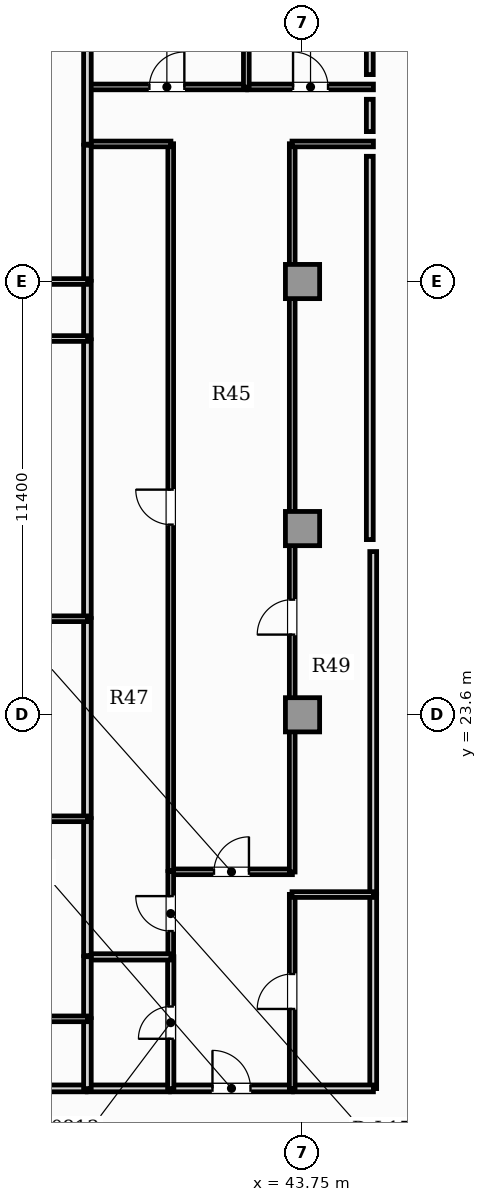
"""IFC4 building model, lengths in metres.
Left out: names, types, materials, properties, quantities, classifications, styles, units other than length and angle.
Written with IfcOpenShell. Run it as: python <this file> out.ifc"""

import sys

from ifc_helpers import new_model, si_unit, direction, frame, frame_2d, origin, origin_2d, place, context, subcontext, project, spatial, rectangle, extrude, element, fill, save


model = new_model("IFC4")
c1 = context("Model", 3, precision=1e-05, world=origin(), true_north=direction((0.0, 1.0)))
c2 = subcontext(c1, "Body", "Model", "MODEL_VIEW")
j1 = project(units=[si_unit("LENGTHUNIT", "METRE"), si_unit("PLANEANGLEUNIT", "RADIAN")], contexts=[c1])
p1 = place(None, origin())
s1 = spatial("IfcSite", under=j1, at=p1, CompositionType="ELEMENT")
p2 = place(p1, origin())
s2 = spatial("IfcBuilding", under=s1, at=p2, CompositionType="ELEMENT")
p3 = place(p2, frame((0.0, 0.0, 72.15)))
s3 = spatial("IfcBuildingStorey", under=s2, at=p3, CompositionType="ELEMENT", Elevation=72.15)
for number, where, z_axis, x_axis in (
    (1, (43.75, 23.6, 0.0), (0.0, 0.0, 1.0), (1.0, 0.0, 0.0)),
    (2, (43.75, 28.5, 0.0), (0.0, 0.0, 1.0), (1.0, 0.0, 0.0)),
    (3, (43.75, 35.0, 0.0), (0.0, 0.0, 1.0), (1.0, 0.0, 0.0)),
):
    element("IfcColumn", number, at=place(p3, frame(where, z_axis=z_axis, x_axis=x_axis)), inside=s3, PredefinedType="COLUMN", context=c2, shape_type="SweptSolid", body=[
        extrude(rectangle(XDim=0.9, YDim=0.9, at=origin_2d()), origin(), (0.0, 0.0, 1.0), 3.85),
    ])
p4 = place(p3, frame((40.277, 13.77, 0.0), z_axis=(0.0, 0.0, 1.0), x_axis=(1.0, 0.0, 0.0)))
e4 = element("IfcWall", 4, at=p4, inside=s3, PredefinedType="PARTITIONING", context=c2, shape_type="SweptSolid", body=[
    extrude(rectangle(XDim=3.206, YDim=0.18, at=frame_2d((1.603, 0.0))), origin(), (0.0, 0.0, 1.0), 3.57),
])
p5 = place(p4, frame((1.103, 0.0, 0.0)))
e5 = element("IfcOpeningElement", 5, at=p5, cuts=e4, PredefinedType="OPENING", context=c2, shape_type="SweptSolid", body=[
    extrude(rectangle(XDim=1.0, YDim=2.15, at=frame_2d((0.5, 1.075))), frame((0.0, 0.1, 0.0), z_axis=(0.0, -1.0, 0.0), x_axis=(1.0, 0.0, 0.0)), (0.0, 0.0, 1.0), 0.2),
])
p6 = place(p3, frame((38.085, 13.77, 0.0), z_axis=(0.0, 0.0, 1.0), x_axis=(1.0, 0.0, 0.0)))
e6 = element("IfcWall", 6, at=p6, inside=s3, PredefinedType="PARTITIONING", context=c2, shape_type="SweptSolid", body=[
    extrude(rectangle(XDim=2.162, YDim=0.18, at=frame_2d((1.081, 0.0))), origin(), (0.0, 0.0, 1.0), 3.57),
])
p7 = place(p3, frame((45.61, 13.765, 0.0), z_axis=(0.0, 0.0, 1.0), x_axis=(0.0, 1.0, 0.0)))
e7 = element("IfcWall", 7, at=p7, inside=s3, PredefinedType="PARTITIONING", context=c2, shape_type="SweptSolid", body=[
    extrude(rectangle(XDim=5.11, YDim=0.18, at=frame_2d((2.555, 0.0))), origin(), (0.0, 0.0, 1.0), 3.57),
])
p8 = place(p3, frame((43.514, 13.77, 0.0), z_axis=(0.0, 0.0, 1.0), x_axis=(1.0, 0.0, 0.0)))
e8 = element("IfcWall", 8, at=p8, inside=s3, PredefinedType="PARTITIONING", context=c2, shape_type="SweptSolid", body=[
    extrude(rectangle(XDim=2.101, YDim=0.18, at=frame_2d((1.051, 0.0))), origin(), (0.0, 0.0, 1.0), 3.57),
])
p9 = place(p3, frame((45.61, 18.905, 0.0), z_axis=(0.0, 0.0, 1.0), x_axis=(0.0, 1.0, 0.0)))
e9 = element("IfcWall", 9, at=p9, inside=s3, PredefinedType="PARTITIONING", context=c2, shape_type="SweptSolid", body=[
    extrude(rectangle(XDim=8.99, YDim=0.18, at=frame_2d((4.495, 0.0))), origin(), (0.0, 0.0, 1.0), 3.57),
])
p10 = place(p3, frame((31.275, 13.77, 0.0), z_axis=(0.0, 0.0, 1.0), x_axis=(1.0, 0.0, 0.0)))
e10 = element("IfcWall", 10, at=p10, inside=s3, PredefinedType="PARTITIONING", context=c2, shape_type="SweptSolid", body=[
    extrude(rectangle(XDim=6.78, YDim=0.18, at=frame_2d((3.39, 0.0))), origin(), (0.0, 0.0, 1.0), 3.57),
])
p11 = place(p3, frame((40.277, 19.469, 0.0), z_axis=(0.0, 0.0, 1.0), x_axis=(1.0, 0.0, 0.0)))
e11 = element("IfcWall", 11, at=p11, inside=s3, PredefinedType="PARTITIONING", context=c2, shape_type="SweptSolid", body=[
    extrude(rectangle(XDim=3.206, YDim=0.15, at=frame_2d((1.603, 0.0))), origin(), (0.0, 0.0, 1.0), 3.57),
])
p12 = place(p11, frame((1.143, 0.0, 0.0)))
e12 = element("IfcOpeningElement", 12, at=p12, cuts=e11, PredefinedType="OPENING", context=c2, shape_type="SweptSolid", body=[
    extrude(rectangle(XDim=0.92, YDim=2.1, at=frame_2d((0.46, 1.05))), frame((0.0, 0.085, 0.0), z_axis=(0.0, -1.0, 0.0), x_axis=(1.0, 0.0, 0.0)), (0.0, 0.0, 1.0), 0.17),
])
p13 = place(p3, frame((40.282, 13.765, 0.0), z_axis=(0.0, 0.0, 1.0), x_axis=(0.0, 1.0, 0.0)))
e13 = element("IfcWall", 13, at=p13, inside=s3, PredefinedType="PLUMBINGWALL", context=c2, shape_type="SweptSolid", body=[
    extrude(rectangle(XDim=3.47, YDim=0.165, at=frame_2d((1.735, 0.0))), origin(), (0.0, 0.0, 1.0), 3.57),
])
p14 = place(p13, frame((1.31, 0.0, 0.0)))
e14 = element("IfcOpeningElement", 14, at=p14, cuts=e13, PredefinedType="OPENING", context=c2, shape_type="SweptSolid", body=[
    extrude(rectangle(XDim=0.85, YDim=2.1, at=frame_2d((0.425, 1.05))), frame((0.0, 0.093, 0.0), z_axis=(0.0, -1.0, 0.0), x_axis=(1.0, 0.0, 0.0)), (0.0, 0.0, 1.0), 0.185),
])
p15 = place(p3, frame((40.282, 17.265, 0.0), z_axis=(0.0, 0.0, 1.0), x_axis=(0.0, 1.0, 0.0)))
e15 = element("IfcWall", 15, at=p15, inside=s3, PredefinedType="PARTITIONING", context=c2, shape_type="SweptSolid", body=[
    extrude(rectangle(XDim=2.209, YDim=0.15, at=frame_2d((1.104, 0.0))), origin(), (0.0, 0.0, 1.0), 3.57),
])
p16 = place(p15, frame((0.644, 0.0, 0.0)))
e16 = element("IfcOpeningElement", 16, at=p16, cuts=e15, PredefinedType="OPENING", context=c2, shape_type="SweptSolid", body=[
    extrude(rectangle(XDim=0.92, YDim=2.1, at=frame_2d((0.46, 1.05))), frame((0.0, 0.085, 0.0), z_axis=(0.0, -1.0, 0.0), x_axis=(1.0, 0.0, 0.0)), (0.0, 0.0, 1.0), 0.17),
])
p17 = place(p3, frame((43.479, 13.765, 0.0), z_axis=(0.0, 0.0, 1.0), x_axis=(0.0, 1.0, 0.0)))
e17 = element("IfcWall", 17, at=p17, inside=s3, PredefinedType="PARTITIONING", context=c2, shape_type="SweptSolid", body=[
    extrude(rectangle(XDim=5.11, YDim=0.15, at=frame_2d((2.555, 0.0))), origin(), (0.0, 0.0, 1.0), 3.57),
])
p18 = place(p17, frame((2.095, 0.0, 0.0)))
e18 = element("IfcOpeningElement", 18, at=p18, cuts=e17, PredefinedType="OPENING", context=c2, shape_type="SweptSolid", body=[
    extrude(rectangle(XDim=0.92, YDim=2.1, at=frame_2d((0.46, 1.05))), frame((0.0, 0.085, 0.0), z_axis=(0.0, -1.0, 0.0), x_axis=(1.0, 0.0, 0.0)), (0.0, 0.0, 1.0), 0.17),
])
p19 = place(p3, frame((40.282, 19.504, 0.0), z_axis=(0.0, 0.0, 1.0), x_axis=(0.0, 1.0, 0.0)))
e19 = element("IfcWall", 19, at=p19, inside=s3, PredefinedType="PARTITIONING", context=c2, shape_type="SweptSolid", body=[
    extrude(rectangle(XDim=19.121, YDim=0.15, at=frame_2d((9.561, 0.0))), origin(), (0.0, 0.0, 1.0), 3.57),
])
p20 = place(p19, frame((9.101, 0.0, 0.0)))
e20 = element("IfcOpeningElement", 20, at=p20, cuts=e19, PredefinedType="OPENING", context=c2, shape_type="SweptSolid", body=[
    extrude(rectangle(XDim=0.92, YDim=2.1, at=frame_2d((0.46, 1.05))), frame((0.0, 0.085, 0.0), z_axis=(0.0, -1.0, 0.0), x_axis=(1.0, 0.0, 0.0)), (0.0, 0.0, 1.0), 0.17),
])
p21 = place(p3, frame((38.085, 38.62, 0.0), z_axis=(0.0, 0.0, 1.0), x_axis=(1.0, 0.0, 0.0)))
e21 = element("IfcWall", 21, at=p21, inside=s3, PredefinedType="PARTITIONING", context=c2, shape_type="SweptSolid", body=[
    extrude(rectangle(XDim=2.202, YDim=0.15, at=frame_2d((1.101, 0.0))), origin(), (0.0, 0.0, 1.0), 3.57),
])
p22 = place(p3, frame((43.479, 19.464, 0.0), z_axis=(0.0, 0.0, 1.0), x_axis=(0.0, 1.0, 0.0)))
e22 = element("IfcWall", 22, at=p22, inside=s3, PredefinedType="PARTITIONING", context=c2, shape_type="SweptSolid", body=[
    extrude(rectangle(XDim=19.161, YDim=0.15, at=frame_2d((9.581, 0.0))), origin(), (0.0, 0.0, 1.0), 3.57),
])
p23 = place(p22, frame((6.247, 0.0, 0.0)))
e23 = element("IfcOpeningElement", 23, at=p23, cuts=e22, PredefinedType="OPENING", context=c2, shape_type="SweptSolid", body=[
    extrude(rectangle(XDim=0.92, YDim=2.1, at=frame_2d((0.46, 1.05))), frame((0.0, 0.085, 0.0), z_axis=(0.0, -1.0, 0.0), x_axis=(1.0, 0.0, 0.0)), (0.0, 0.0, 1.0), 0.17),
])
p24 = place(p3, frame((43.474, 38.62, 0.0), z_axis=(0.0, 0.0, 1.0), x_axis=(1.0, 0.0, 0.0)))
e24 = element("IfcWall", 24, at=p24, inside=s3, PredefinedType="PARTITIONING", context=c2, shape_type="SweptSolid", body=[
    extrude(rectangle(XDim=2.141, YDim=0.15, at=frame_2d((1.071, 0.0))), origin(), (0.0, 0.0, 1.0), 3.57),
])
p25 = place(p3, frame((38.085, 40.12, 0.0), z_axis=(0.0, 0.0, 1.0), x_axis=(1.0, 0.0, 0.0)))
e25 = element("IfcWall", 25, at=p25, inside=s3, PredefinedType="PARTITIONING", context=c2, shape_type="SweptSolid", body=[
    extrude(rectangle(XDim=4.191, YDim=0.15, at=frame_2d((2.096, 0.0))), origin(), (0.0, 0.0, 1.0), 3.57),
])
p26 = place(p25, frame((1.635, 0.0, 0.0)))
e26 = element("IfcOpeningElement", 26, at=p26, cuts=e25, PredefinedType="OPENING", context=c2, shape_type="SweptSolid", body=[
    extrude(rectangle(XDim=0.92, YDim=2.1, at=frame_2d((0.46, 1.05))), frame((0.0, 0.085, 0.0), z_axis=(0.0, -1.0, 0.0), x_axis=(1.0, 0.0, 0.0)), (0.0, 0.0, 1.0), 0.17),
])
p27 = place(p3, frame((42.306, 40.12, 0.0), z_axis=(0.0, 0.0, 1.0), x_axis=(1.0, 0.0, 0.0)))
e27 = element("IfcWall", 27, at=p27, inside=s3, PredefinedType="PARTITIONING", context=c2, shape_type="SweptSolid", body=[
    extrude(rectangle(XDim=3.309, YDim=0.15, at=frame_2d((1.654, 0.0))), origin(), (0.0, 0.0, 1.0), 3.57),
])
p28 = place(p27, frame((1.194, 0.0, 0.0)))
e28 = element("IfcOpeningElement", 28, at=p28, cuts=e27, PredefinedType="OPENING", context=c2, shape_type="SweptSolid", body=[
    extrude(rectangle(XDim=0.92, YDim=2.1, at=frame_2d((0.46, 1.05))), frame((0.0, 0.085, 0.0), z_axis=(0.0, -1.0, 0.0), x_axis=(1.0, 0.0, 0.0)), (0.0, 0.0, 1.0), 0.17),
])
p29 = place(p3, frame((38.09, 38.615, 0.0), z_axis=(0.0, 0.0, 1.0), x_axis=(0.0, 1.0, 0.0)))
e29 = element("IfcWall", 29, at=p29, inside=s3, PredefinedType="PARTITIONING", context=c2, shape_type="SweptSolid", body=[
    extrude(rectangle(XDim=2.775, YDim=0.2, at=frame_2d((1.387, 0.0))), origin(), (0.0, 0.0, 1.0), 3.57),
])
p30 = place(p3, frame((38.085, 17.23, 0.0), z_axis=(0.0, 0.0, 1.0), x_axis=(1.0, 0.0, 0.0)))
e30 = element("IfcWall", 30, at=p30, inside=s3, PredefinedType="PLUMBINGWALL", context=c2, shape_type="SweptSolid", body=[
    extrude(rectangle(XDim=2.202, YDim=0.165, at=frame_2d((1.101, 0.0))), origin(), (0.0, 0.0, 1.0), 3.57),
])
p31 = place(p3, frame((38.09, 13.765, 0.0), z_axis=(0.0, 0.0, 1.0), x_axis=(0.0, 1.0, 0.0)))
e31 = element("IfcWall", 31, at=p31, inside=s3, PredefinedType="PARTITIONING", context=c2, shape_type="SweptSolid", body=[
    extrude(rectangle(XDim=1.84, YDim=0.2, at=frame_2d((0.92, 0.0))), origin(), (0.0, 0.0, 1.0), 3.57),
])
p32 = place(p3, frame((38.09, 15.635, 0.0), z_axis=(0.0, 0.0, 1.0), x_axis=(0.0, 1.0, 0.0)))
e32 = element("IfcWall", 32, at=p32, inside=s3, PredefinedType="PARTITIONING", context=c2, shape_type="SweptSolid", body=[
    extrude(rectangle(XDim=1.6, YDim=0.2, at=frame_2d((0.8, 0.0))), origin(), (0.0, 0.0, 1.0), 3.57),
])
p33 = place(p3, frame((38.09, 33.495, 0.0), z_axis=(0.0, 0.0, 1.0), x_axis=(0.0, 1.0, 0.0)))
e33 = element("IfcWall", 33, at=p33, inside=s3, PredefinedType="PARTITIONING", context=c2, shape_type="SweptSolid", body=[
    extrude(rectangle(XDim=1.51, YDim=0.2, at=frame_2d((0.755, 0.0))), origin(), (0.0, 0.0, 1.0), 3.57),
])
p34 = place(p3, frame((38.09, 17.265, 0.0), z_axis=(0.0, 0.0, 1.0), x_axis=(0.0, 1.0, 0.0)))
e34 = element("IfcWall", 34, at=p34, inside=s3, PredefinedType="PARTITIONING", context=c2, shape_type="SweptSolid", body=[
    extrude(rectangle(XDim=3.604, YDim=0.2, at=frame_2d((1.802, 0.0))), origin(), (0.0, 0.0, 1.0), 3.57),
])
p35 = place(p3, frame((38.09, 20.899, 0.0), z_axis=(0.0, 0.0, 1.0), x_axis=(0.0, 1.0, 0.0)))
e35 = element("IfcWall", 35, at=p35, inside=s3, PredefinedType="PARTITIONING", context=c2, shape_type="SweptSolid", body=[
    extrude(rectangle(XDim=5.234, YDim=0.2, at=frame_2d((2.617, 0.0))), origin(), (0.0, 0.0, 1.0), 3.57),
])
p36 = place(p3, frame((38.09, 26.162, 0.0), z_axis=(0.0, 0.0, 1.0), x_axis=(0.0, 1.0, 0.0)))
e36 = element("IfcWall", 36, at=p36, inside=s3, PredefinedType="PARTITIONING", context=c2, shape_type="SweptSolid", body=[
    extrude(rectangle(XDim=7.303, YDim=0.2, at=frame_2d((3.651, 0.0))), origin(), (0.0, 0.0, 1.0), 3.57),
])
p37 = place(p3, frame((38.09, 35.035, 0.0), z_axis=(0.0, 0.0, 1.0), x_axis=(0.0, 1.0, 0.0)))
e37 = element("IfcWall", 37, at=p37, inside=s3, PredefinedType="PARTITIONING", context=c2, shape_type="SweptSolid", body=[
    extrude(rectangle(XDim=3.55, YDim=0.2, at=frame_2d((1.775, 0.0))), origin(), (0.0, 0.0, 1.0), 3.57),
])
p38 = place(p3, frame((43.474, 18.87, 0.0), z_axis=(0.0, 0.0, 1.0), x_axis=(1.0, 0.0, 0.0)))
e38 = element("IfcWall", 38, at=p38, inside=s3, PredefinedType="PARTITIONING", context=c2, shape_type="SweptSolid", body=[
    extrude(rectangle(XDim=2.141, YDim=0.15, at=frame_2d((1.071, 0.0))), origin(), (0.0, 0.0, 1.0), 3.57),
])
p39 = place(p3, frame((42.271, 40.115, 0.0), z_axis=(0.0, 0.0, 1.0), x_axis=(0.0, 1.0, 0.0)))
e39 = element("IfcWall", 39, at=p39, inside=s3, PredefinedType="PARTITIONING", context=c2, shape_type="SweptSolid", body=[
    extrude(rectangle(XDim=6.075, YDim=0.15, at=frame_2d((3.038, 0.0))), origin(), (0.0, 0.0, 1.0), 3.57),
])
p40 = place(p3, frame((31.235, 33.5, 0.0), z_axis=(0.0, 0.0, 1.0), x_axis=(1.0, 0.0, 0.0)))
e40 = element("IfcWall", 40, at=p40, inside=s3, PredefinedType="PARTITIONING", context=c2, shape_type="SweptSolid", body=[
    extrude(rectangle(XDim=6.86, YDim=0.15, at=frame_2d((3.43, 0.0))), origin(), (0.0, 0.0, 1.0), 3.57),
])
p41 = place(p3, frame((32.894, 35.0, 0.0), z_axis=(0.0, 0.0, 1.0), x_axis=(1.0, 0.0, 0.0)))
e41 = element("IfcWall", 41, at=p41, inside=s3, PredefinedType="PARTITIONING", context=c2, shape_type="SweptSolid", body=[
    extrude(rectangle(XDim=5.201, YDim=0.15, at=frame_2d((2.601, 0.0))), origin(), (0.0, 0.0, 1.0), 2.934),
])
p42 = place(p41, frame((1.361, 0.0, 0.0)))
e42 = element("IfcOpeningElement", 42, at=p42, cuts=e41, PredefinedType="OPENING", context=c2, shape_type="SweptSolid", body=[
    extrude(rectangle(XDim=0.92, YDim=2.1, at=frame_2d((0.46, 1.05))), frame((0.0, 0.085, 0.0), z_axis=(0.0, -1.0, 0.0), x_axis=(1.0, 0.0, 0.0)), (0.0, 0.0, 1.0), 0.17),
])
for number, where, z_axis, x_axis in (
    (43, (31.235, 15.6, 0.0), (0.0, 0.0, 1.0), (1.0, 0.0, 0.0)),
    (44, (31.235, 20.864, 0.0), (0.0, 0.0, 1.0), (1.0, 0.0, 0.0)),
    (45, (31.235, 26.127, 0.0), (0.0, 0.0, 1.0), (1.0, 0.0, 0.0)),
):
    element("IfcWall", number, at=place(p3, frame(where, z_axis=z_axis, x_axis=x_axis)), inside=s3, PredefinedType="PARTITIONING", context=c2, shape_type="SweptSolid", body=[
        extrude(rectangle(XDim=6.86, YDim=0.15, at=frame_2d((3.43, 0.0))), origin(), (0.0, 0.0, 1.0), 3.57),
    ])
p43 = place(p3, frame((45.52, 39.795, 0.0), z_axis=(0.0, 0.0, 1.0), x_axis=(0.0, -1.0, 0.0)))
e46 = element("IfcWall", 46, at=p43, inside=s3, PredefinedType="PARTITIONING", context=c2, shape_type="SweptSolid", body=[
    extrude(rectangle(XDim=0.85, YDim=0.18, at=frame_2d((0.425, 0.0))), origin(), (0.0, 0.0, 1.0), 3.57),
])
p44 = place(p3, frame((45.52, 38.295, 0.0), z_axis=(0.0, 0.0, 1.0), x_axis=(0.0, -1.0, 0.0)))
e47 = element("IfcWall", 47, at=p44, inside=s3, PredefinedType="PARTITIONING", context=c2, shape_type="SweptSolid", body=[
    extrude(rectangle(XDim=10.085, YDim=0.18, at=frame_2d((5.042, 0.0))), origin(), (0.0, 0.0, 1.0), 3.57),
])
p45 = place(p3, frame((45.52, 46.19, 0.0), z_axis=(0.0, 0.0, 1.0), x_axis=(0.0, -1.0, 0.0)))
e48 = element("IfcWall", 48, at=p45, inside=s3, PredefinedType="PARTITIONING", context=c2, shape_type="SweptSolid", body=[
    extrude(rectangle(XDim=5.745, YDim=0.18, at=frame_2d((2.873, 0.0))), origin(), (0.0, 0.0, 1.0), 3.57),
])
p46 = place(p5, origin())
e49 = element("IfcDoor", 49, at=p46, inside=s3, OperationType="SINGLE_SWING_LEFT", PredefinedType="DOOR", context=c2, shape_type="SweptSolid", body=[
    extrude(rectangle(XDim=1.0, YDim=2.15, at=frame_2d((0.5, 1.075))), frame((0.0, 0.025, 0.0), z_axis=(0.0, -1.0, 0.0), x_axis=(1.0, 0.0, 0.0)), (0.0, 0.0, 1.0), 0.05),
])
fill(e5, e49)
p47 = place(p12, origin())
e50 = element("IfcDoor", 50, at=p47, inside=s3, OperationType="SINGLE_SWING_RIGHT", PredefinedType="DOOR", context=c2, shape_type="SweptSolid", body=[
    extrude(rectangle(XDim=0.92, YDim=2.1, at=frame_2d((0.46, 1.05))), frame((0.0, 0.025, 0.0), z_axis=(0.0, -1.0, 0.0), x_axis=(1.0, 0.0, 0.0)), (0.0, 0.0, 1.0), 0.05),
])
fill(e12, e50)
p48 = place(p14, origin())
e51 = element("IfcDoor", 51, at=p48, inside=s3, OperationType="SINGLE_SWING_LEFT", PredefinedType="DOOR", context=c2, shape_type="SweptSolid", body=[
    extrude(rectangle(XDim=0.85, YDim=2.1, at=frame_2d((0.425, 1.05))), frame((0.0, 0.025, 0.0), z_axis=(0.0, -1.0, 0.0), x_axis=(1.0, 0.0, 0.0)), (0.0, 0.0, 1.0), 0.05),
])
fill(e14, e51)
p49 = place(p16, origin())
e52 = element("IfcDoor", 52, at=p49, inside=s3, OperationType="SINGLE_SWING_RIGHT", PredefinedType="DOOR", context=c2, shape_type="SweptSolid", body=[
    extrude(rectangle(XDim=0.92, YDim=2.1, at=frame_2d((0.46, 1.05))), frame((0.0, 0.025, 0.0), z_axis=(0.0, -1.0, 0.0), x_axis=(1.0, 0.0, 0.0)), (0.0, 0.0, 1.0), 0.05),
])
fill(e16, e52)
p50 = place(p18, origin())
e53 = element("IfcDoor", 53, at=p50, inside=s3, OperationType="SINGLE_SWING_LEFT", PredefinedType="DOOR", context=c2, shape_type="SweptSolid", body=[
    extrude(rectangle(XDim=0.92, YDim=2.1, at=frame_2d((0.46, 1.05))), frame((0.0, 0.025, 0.0), z_axis=(0.0, -1.0, 0.0), x_axis=(1.0, 0.0, 0.0)), (0.0, 0.0, 1.0), 0.05),
])
fill(e18, e53)
p51 = place(p20, origin())
e54 = element("IfcDoor", 54, at=p51, inside=s3, OperationType="SINGLE_SWING_RIGHT", PredefinedType="DOOR", context=c2, shape_type="SweptSolid", body=[
    extrude(rectangle(XDim=0.92, YDim=2.1, at=frame_2d((0.46, 1.05))), frame((0.0, 0.025, 0.0), z_axis=(0.0, -1.0, 0.0), x_axis=(1.0, 0.0, 0.0)), (0.0, 0.0, 1.0), 0.05),
])
fill(e20, e54)
p52 = place(p23, origin())
e55 = element("IfcDoor", 55, at=p52, inside=s3, OperationType="SINGLE_SWING_LEFT", PredefinedType="DOOR", context=c2, shape_type="SweptSolid", body=[
    extrude(rectangle(XDim=0.92, YDim=2.1, at=frame_2d((0.46, 1.05))), frame((0.0, 0.025, 0.0), z_axis=(0.0, -1.0, 0.0), x_axis=(1.0, 0.0, 0.0)), (0.0, 0.0, 1.0), 0.05),
])
fill(e23, e55)
p53 = place(p26, origin())
e56 = element("IfcDoor", 56, at=p53, inside=s3, OperationType="SINGLE_SWING_RIGHT", PredefinedType="DOOR", context=c2, shape_type="SweptSolid", body=[
    extrude(rectangle(XDim=0.92, YDim=2.1, at=frame_2d((0.46, 1.05))), frame((0.0, 0.025, 0.0), z_axis=(0.0, -1.0, 0.0), x_axis=(1.0, 0.0, 0.0)), (0.0, 0.0, 1.0), 0.05),
])
fill(e26, e56)
p54 = place(p28, origin())
e57 = element("IfcDoor", 57, at=p54, inside=s3, OperationType="SINGLE_SWING_LEFT", PredefinedType="DOOR", context=c2, shape_type="SweptSolid", body=[
    extrude(rectangle(XDim=0.92, YDim=2.1, at=frame_2d((0.46, 1.05))), frame((0.0, 0.025, 0.0), z_axis=(0.0, -1.0, 0.0), x_axis=(1.0, 0.0, 0.0)), (0.0, 0.0, 1.0), 0.05),
])
fill(e28, e57)
save(model, sys.argv[1])
